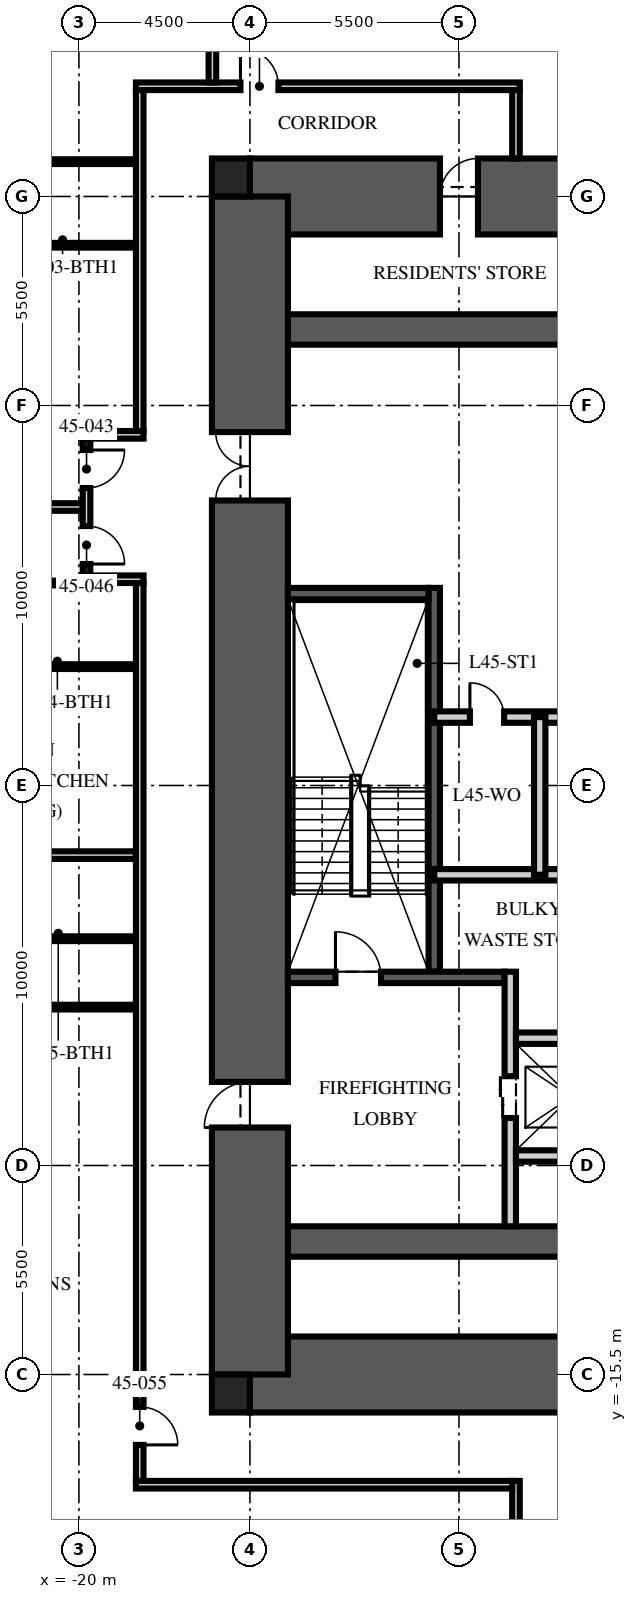
"""IFC4 building model, lengths in metres.
Left out: names, types, materials, properties, quantities, classifications, styles, units other than length and angle.
Written with IfcOpenShell. Run it as: python <this file> out.ifc"""

import sys

from ifc_helpers import new_model, si_unit, direction, frame, frame_2d, origin, origin_2d, place, context, subcontext, project, spatial, rectangle, extrude, element, fill, save


model = new_model("IFC4")
c1 = context("Model", 3, precision=1e-05, world=origin(), true_north=direction((0.0, 1.0)))
c2 = subcontext(c1, "Body", "Model", "MODEL_VIEW")
j1 = project(units=[si_unit("LENGTHUNIT", "METRE"), si_unit("PLANEANGLEUNIT", "RADIAN")], contexts=[c1])
p1 = place(None, origin())
s1 = spatial("IfcSite", under=j1, at=p1, CompositionType="ELEMENT")
p2 = place(p1, origin())
s2 = spatial("IfcBuilding", under=s1, at=p2, CompositionType="ELEMENT")
p3 = place(p2, frame((0.0, 0.0, 178.5)))
s3 = spatial("IfcBuildingStorey", under=s2, at=p3, CompositionType="ELEMENT", Elevation=178.5)
p4 = place(p3, frame((-15.5, 15.5, -0.25), z_axis=(0.0, 0.0, 1.0), x_axis=(1.0, 0.0, 0.0)))
e1 = element("IfcWall", 1, at=p4, inside=s3, PredefinedType="SHEAR", context=c2, shape_type="SweptSolid", body=[
    extrude(rectangle(XDim=31.0, YDim=2.0, at=frame_2d((15.5, 0.0))), origin(), (0.0, 0.0, 1.0), 3.75),
])
p5 = place(p4, frame((5.0, 0.0, 0.25)))
e2 = element("IfcOpeningElement", 2, at=p5, cuts=e1, PredefinedType="OPENING", context=c2, shape_type="SweptSolid", body=[
    extrude(rectangle(XDim=1.0, YDim=2.1, at=frame_2d((0.5, 1.05))), frame((0.0, 1.01, 0.0), z_axis=(0.0, -1.0, 0.0), x_axis=(1.0, 0.0, 0.0)), (0.0, 0.0, 1.0), 2.02),
])
p6 = place(p3, frame((-15.5, -15.5, -0.25), z_axis=(0.0, 0.0, 1.0), x_axis=(1.0, 0.0, 0.0)))
e3 = element("IfcWall", 3, at=p6, inside=s3, PredefinedType="SHEAR", context=c2, shape_type="SweptSolid", body=[
    extrude(rectangle(XDim=31.0, YDim=2.0, at=frame_2d((15.5, 0.0))), origin(), (0.0, 0.0, 1.0), 3.75),
])
p7 = place(p6, frame((10.4, 0.0, 0.25)))
e4 = element("IfcOpeningElement", 4, at=p7, cuts=e3, PredefinedType="OPENING", context=c2, shape_type="SweptSolid", body=[
    extrude(rectangle(XDim=1.1, YDim=2.1, at=frame_2d((0.55, 1.05))), frame((0.0, 1.01, 0.0), z_axis=(0.0, -1.0, 0.0), x_axis=(1.0, 0.0, 0.0)), (0.0, 0.0, 1.0), 2.02),
])
p8 = place(p6, frame((13.5, 0.0, 0.25)))
e5 = element("IfcOpeningElement", 5, at=p8, cuts=e3, PredefinedType="OPENING", context=c2, shape_type="SweptSolid", body=[
    extrude(rectangle(XDim=1.1, YDim=2.1, at=frame_2d((0.55, 1.05))), frame((0.0, 1.01, 0.0), z_axis=(0.0, -1.0, 0.0), x_axis=(1.0, 0.0, 0.0)), (0.0, 0.0, 1.0), 2.02),
])
p9 = place(p6, frame((16.6, 0.0, 0.25)))
e6 = element("IfcOpeningElement", 6, at=p9, cuts=e3, PredefinedType="OPENING", context=c2, shape_type="SweptSolid", body=[
    extrude(rectangle(XDim=1.1, YDim=2.1, at=frame_2d((0.55, 1.05))), frame((0.0, 1.01, 0.0), z_axis=(0.0, -1.0, 0.0), x_axis=(1.0, 0.0, 0.0)), (0.0, 0.0, 1.0), 2.02),
])
for number, where, z_axis, x_axis in (
    (7, (-15.5, 12.0, -0.25), (0.0, 0.0, 1.0), (1.0, 0.0, 0.0)),
    (8, (-15.5, -12.0, -0.25), (0.0, 0.0, 1.0), (1.0, 0.0, 0.0)),
):
    element("IfcWall", number, at=place(p3, frame(where, z_axis=z_axis, x_axis=x_axis)), inside=s3, PredefinedType="SHEAR", context=c2, shape_type="SweptSolid", body=[
        extrude(rectangle(XDim=31.0, YDim=0.8, at=frame_2d((15.5, 0.0))), origin(), (0.0, 0.0, 1.0), 3.75),
    ])
p10 = place(p3, frame((-15.5, -15.5, -0.25), z_axis=(0.0, 0.0, 1.0), x_axis=(0.0, 1.0, 0.0)))
e9 = element("IfcWall", 9, at=p10, inside=s3, PredefinedType="SHEAR", context=c2, shape_type="SweptSolid", body=[
    extrude(rectangle(XDim=31.0, YDim=2.0, at=frame_2d((15.5, 0.0))), origin(), (0.0, 0.0, 1.0), 3.75),
])
p11 = place(p10, frame((6.5, 0.0, 0.25)))
e10 = element("IfcOpeningElement", 10, at=p11, cuts=e9, PredefinedType="OPENING", context=c2, shape_type="SweptSolid", body=[
    extrude(rectangle(XDim=1.2, YDim=2.1, at=frame_2d((0.6, 1.05))), frame((0.0, 1.01, 0.0), z_axis=(0.0, -1.0, 0.0), x_axis=(1.0, 0.0, 0.0)), (0.0, 0.0, 1.0), 2.02),
])
p12 = place(p10, frame((23.0, 0.0, 0.25)))
e11 = element("IfcOpeningElement", 11, at=p12, cuts=e9, PredefinedType="OPENING", context=c2, shape_type="SweptSolid", body=[
    extrude(rectangle(XDim=1.8, YDim=2.1, at=frame_2d((0.9, 1.05))), frame((0.0, 1.01, 0.0), z_axis=(0.0, -1.0, 0.0), x_axis=(1.0, 0.0, 0.0)), (0.0, 0.0, 1.0), 2.02),
])
for number, where, z_axis, x_axis in (
    (12, (-16.0, 16.0, -0.25), (0.0, 0.0, 1.0), (1.0, 0.0, 0.0)),
    (13, (-16.0, -16.0, -0.25), (0.0, 0.0, 1.0), (1.0, 0.0, 0.0)),
):
    element("IfcColumn", number, at=place(p3, frame(where, z_axis=z_axis, x_axis=x_axis)), inside=s3, PredefinedType="COLUMN", context=c2, shape_type="SweptSolid", body=[
        extrude(rectangle(XDim=1.0, YDim=1.0, at=origin_2d()), origin(), (0.0, 0.0, 1.0), 3.75),
    ])
p13 = place(p3, frame((-10.65, -4.9, 0.0), z_axis=(0.0, 0.0, 1.0), x_axis=(0.0, 1.0, 0.0)))
e14 = element("IfcWall", 14, at=p13, inside=s3, PredefinedType="SOLIDWALL", context=c2, shape_type="SweptSolid", body=[
    extrude(rectangle(XDim=10.1, YDim=0.3, at=frame_2d((5.05, 0.0))), origin(), (0.0, 0.0, 1.0), 3.5),
])
p14 = place(p3, frame((-14.5, -5.05, 0.0), z_axis=(0.0, 0.0, 1.0), x_axis=(1.0, 0.0, 0.0)))
e15 = element("IfcWall", 15, at=p14, inside=s3, PredefinedType="SOLIDWALL", context=c2, shape_type="SweptSolid", body=[
    extrude(rectangle(XDim=5.7, YDim=0.3, at=frame_2d((2.85, 0.0))), origin(), (0.0, 0.0, 1.0), 3.5),
])
p15 = place(p14, frame((1.25, 0.0, 0.0)))
e16 = element("IfcOpeningElement", 16, at=p15, cuts=e15, PredefinedType="OPENING", context=c2, shape_type="SweptSolid", body=[
    extrude(rectangle(XDim=1.2, YDim=2.1, at=frame_2d((0.6, 1.05))), frame((0.0, 0.16, 0.0), z_axis=(0.0, -1.0, 0.0), x_axis=(1.0, 0.0, 0.0)), (0.0, 0.0, 1.0), 0.32),
])
p16 = place(p3, frame((-14.5, 5.05, 0.0), z_axis=(0.0, 0.0, 1.0), x_axis=(1.0, 0.0, 0.0)))
e17 = element("IfcWall", 17, at=p16, inside=s3, PredefinedType="SOLIDWALL", context=c2, shape_type="SweptSolid", body=[
    extrude(rectangle(XDim=3.7, YDim=0.3, at=frame_2d((1.85, 0.0))), origin(), (0.0, 0.0, 1.0), 3.5),
])
p17 = place(p3, frame((-8.65, -11.6, 0.0), z_axis=(0.0, 0.0, 1.0), x_axis=(0.0, 1.0, 0.0)))
e18 = element("IfcWall", 18, at=p17, inside=s3, PredefinedType="PARTITIONING", context=c2, shape_type="SweptSolid", body=[
    extrude(rectangle(XDim=6.7, YDim=0.3, at=frame_2d((3.35, 0.0))), origin(), (0.0, 0.0, 1.0), 3.5),
])
p18 = place(p17, frame((2.85, 0.0, 0.0)))
e19 = element("IfcOpeningElement", 19, at=p18, cuts=e18, PredefinedType="OPENING", context=c2, shape_type="SweptSolid", body=[
    extrude(rectangle(XDim=1.1, YDim=2.1, at=frame_2d((0.55, 1.05))), frame((0.0, 0.16, 0.0), z_axis=(0.0, -1.0, 0.0), x_axis=(1.0, 0.0, 0.0)), (0.0, 0.0, 1.0), 0.32),
])
p19 = place(p3, frame((-8.5, -6.65, 0.0), z_axis=(0.0, 0.0, 1.0), x_axis=(1.0, 0.0, 0.0)))
e20 = element("IfcWall", 20, at=p19, inside=s3, PredefinedType="PARTITIONING", context=c2, shape_type="SweptSolid", body=[
    extrude(rectangle(XDim=17.0, YDim=0.3, at=frame_2d((8.5, 0.0))), origin(), (0.0, 0.0, 1.0), 3.5),
])
p20 = place(p19, frame((7.8, 0.0, 0.0)))
e21 = element("IfcOpeningElement", 21, at=p20, cuts=e20, PredefinedType="OPENING", context=c2, shape_type="SweptSolid", body=[
    extrude(rectangle(XDim=1.3, YDim=2.4, at=frame_2d((0.65, 1.2))), frame((0.0, 0.16, 0.0), z_axis=(0.0, -1.0, 0.0), x_axis=(1.0, 0.0, 0.0)), (0.0, 0.0, 1.0), 0.32),
])
p21 = place(p19, frame((5.65, 0.0, 0.0)))
e22 = element("IfcOpeningElement", 22, at=p21, cuts=e20, PredefinedType="OPENING", context=c2, shape_type="SweptSolid", body=[
    extrude(rectangle(XDim=0.9, YDim=2.1, at=frame_2d((0.45, 1.05))), frame((0.0, 0.16, 0.0), z_axis=(0.0, -1.0, 0.0), x_axis=(1.0, 0.0, 0.0)), (0.0, 0.0, 1.0), 0.32),
])
p22 = place(p19, frame((10.4, 0.0, 0.0)))
e23 = element("IfcOpeningElement", 23, at=p22, cuts=e20, PredefinedType="OPENING", context=c2, shape_type="SweptSolid", body=[
    extrude(rectangle(XDim=0.9, YDim=2.1, at=frame_2d((0.45, 1.05))), frame((0.0, 0.16, 0.0), z_axis=(0.0, -1.0, 0.0), x_axis=(1.0, 0.0, 0.0)), (0.0, 0.0, 1.0), 0.32),
])
p23 = place(p3, frame((-8.5, -9.75, 0.0), z_axis=(0.0, 0.0, 1.0), x_axis=(1.0, 0.0, 0.0)))
e24 = element("IfcWall", 24, at=p23, inside=s3, PredefinedType="PARTITIONING", context=c2, shape_type="SweptSolid", body=[
    extrude(rectangle(XDim=2.9, YDim=0.3, at=frame_2d((1.45, 0.0))), origin(), (0.0, 0.0, 1.0), 3.5),
])
p24 = place(p3, frame((-10.65, 1.8, 0.0), z_axis=(0.0, 0.0, 1.0), x_axis=(1.0, 0.0, 0.0)))
e25 = element("IfcWall", 25, at=p24, inside=s3, PredefinedType="PARTITIONING", context=c2, shape_type="SweptSolid", body=[
    extrude(rectangle(XDim=21.3, YDim=0.3, at=frame_2d((10.65, 0.0))), origin(), (0.0, 0.0, 1.0), 3.5),
])
p25 = place(p24, frame((10.05, 0.0, 0.0)))
e26 = element("IfcOpeningElement", 26, at=p25, cuts=e25, PredefinedType="OPENING", context=c2, shape_type="SweptSolid", body=[
    extrude(rectangle(XDim=1.2, YDim=2.1, at=frame_2d((0.6, 1.05))), frame((0.0, 0.16, 0.0), z_axis=(0.0, -1.0, 0.0), x_axis=(1.0, 0.0, 0.0)), (0.0, 0.0, 1.0), 0.32),
])
p26 = place(p24, frame((0.938, 0.0, 0.0)))
e27 = element("IfcOpeningElement", 27, at=p26, cuts=e25, PredefinedType="OPENING", context=c2, shape_type="SweptSolid", body=[
    extrude(rectangle(XDim=0.9, YDim=2.1, at=frame_2d((0.45, 1.05))), frame((0.0, 0.16, 0.0), z_axis=(0.0, -1.0, 0.0), x_axis=(1.0, 0.0, 0.0)), (0.0, 0.0, 1.0), 0.32),
])
p27 = place(p3, frame((-10.65, -2.35, 0.0), z_axis=(0.0, 0.0, 1.0), x_axis=(1.0, 0.0, 0.0)))
e28 = element("IfcWall", 28, at=p27, inside=s3, PredefinedType="PARTITIONING", context=c2, shape_type="SweptSolid", body=[
    extrude(rectangle(XDim=5.55, YDim=0.3, at=frame_2d((2.775, 0.0))), origin(), (0.0, 0.0, 1.0), 3.5),
])
p28 = place(p3, frame((-7.875, -2.35, 0.0), z_axis=(0.0, 0.0, 1.0), x_axis=(0.0, 1.0, 0.0)))
e29 = element("IfcWall", 29, at=p28, inside=s3, PredefinedType="PARTITIONING", context=c2, shape_type="SweptSolid", body=[
    extrude(rectangle(XDim=4.15, YDim=0.3, at=frame_2d((2.075, 0.0))), origin(), (0.0, 0.0, 1.0), 3.5),
])
p29 = place(p3, frame((-18.5, 18.4, 0.0), z_axis=(0.0, 0.0, 1.0), x_axis=(1.0, 0.0, 0.0)))
e30 = element("IfcWall", 30, at=p29, inside=s3, PredefinedType="PARTITIONING", context=c2, shape_type="SweptSolid", body=[
    extrude(rectangle(XDim=10.1, YDim=0.2, at=frame_2d((5.05, 0.0))), origin(), (0.0, 0.0, 1.0), 2.3),
])
p30 = place(p29, frame((2.75, 0.0, 0.0)))
e31 = element("IfcOpeningElement", 31, at=p30, cuts=e30, PredefinedType="OPENING", context=c2, shape_type="SweptSolid", body=[
    extrude(rectangle(XDim=1.0, YDim=2.2, at=frame_2d((0.5, 1.1))), frame((0.0, 0.11, 0.0), z_axis=(0.0, -1.0, 0.0), x_axis=(1.0, 0.0, 0.0)), (0.0, 0.0, 1.0), 0.22),
])
p31 = place(p3, frame((-8.5, 18.3, 0.0), z_axis=(0.0, 0.0, 1.0), x_axis=(0.0, -1.0, 0.0)))
e32 = element("IfcWall", 32, at=p31, inside=s3, PredefinedType="PARTITIONING", context=c2, shape_type="SweptSolid", body=[
    extrude(rectangle(XDim=1.8, YDim=0.2, at=frame_2d((0.9, 0.0))), origin(), (0.0, 0.0, 1.0), 3.5),
])
p32 = place(p3, frame((-16.488, 18.5, 0.0), z_axis=(0.0, 0.0, 1.0), x_axis=(0.0, 1.0, 0.0)))
e33 = element("IfcWall", 33, at=p32, inside=s3, PredefinedType="PARTITIONING", context=c2, shape_type="SweptSolid", body=[
    extrude(rectangle(XDim=9.65, YDim=0.2, at=frame_2d((4.825, 0.0))), origin(), (0.0, 0.0, 1.0), 2.81),
])
p33 = place(p3, frame((-19.9, 7.328, 0.0), z_axis=(0.0, 0.0, 1.0), x_axis=(-1.0, 0.0, 0.0)))
e34 = element("IfcWall", 34, at=p33, inside=s3, PredefinedType="PARTITIONING", context=c2, shape_type="SweptSolid", body=[
    extrude(rectangle(XDim=8.25, YDim=0.2, at=frame_2d((4.125, 0.0))), origin(), (0.0, 0.0, 1.0), 2.81),
])
p34 = place(p3, frame((-18.5, -1.832, 0.0), z_axis=(0.0, 0.0, 1.0), x_axis=(-1.0, 0.0, 0.0)))
e35 = element("IfcWall", 35, at=p34, inside=s3, PredefinedType="PARTITIONING", context=c2, shape_type="SweptSolid", body=[
    extrude(rectangle(XDim=9.65, YDim=0.2, at=frame_2d((4.825, 0.0))), origin(), (0.0, 0.0, 1.0), 2.81),
])
for number, where, z_axis, x_axis in (
    (36, (-18.5, 16.417, 0.0), (0.0, 0.0, 1.0), (-1.0, 0.0, 0.0)),
    (37, (-18.5, 14.217, 0.0), (0.0, 0.0, 1.0), (-1.0, 0.0, 0.0)),
):
    element("IfcWall", number, at=place(p3, frame(where, z_axis=z_axis, x_axis=x_axis)), inside=s3, PredefinedType="PARTITIONING", context=c2, shape_type="SweptSolid", body=[
        extrude(rectangle(XDim=3.53, YDim=0.125, at=frame_2d((1.765, 0.0))), origin(), (0.0, 0.0, 1.0), 3.5),
    ])
p35 = place(p3, frame((-19.97, 5.328, 0.0), z_axis=(0.0, 0.0, 1.0), x_axis=(-1.0, 0.0, 0.0)))
e38 = element("IfcWall", 38, at=p35, inside=s3, PredefinedType="PARTITIONING", context=c2, shape_type="SweptSolid", body=[
    extrude(rectangle(XDim=2.06, YDim=0.125, at=frame_2d((1.03, 0.0))), origin(), (0.0, 0.0, 1.0), 3.5),
])
for number, where, z_axis, x_axis in (
    (39, (-18.5, 3.128, 0.0), (0.0, 0.0, 1.0), (-1.0, 0.0, 0.0)),
    (40, (-18.5, -4.032, 0.0), (0.0, 0.0, 1.0), (-1.0, 0.0, 0.0)),
    (41, (-18.5, -5.832, 0.0), (0.0, 0.0, 1.0), (-1.0, 0.0, 0.0)),
):
    element("IfcWall", number, at=place(p3, frame(where, z_axis=z_axis, x_axis=x_axis)), inside=s3, PredefinedType="PARTITIONING", context=c2, shape_type="SweptSolid", body=[
        extrude(rectangle(XDim=3.53, YDim=0.125, at=frame_2d((1.765, 0.0))), origin(), (0.0, 0.0, 1.0), 3.5),
    ])
p36 = place(p3, frame((-18.4, 18.3, 0.0), z_axis=(0.0, 0.0, 1.0), x_axis=(0.0, -1.0, 0.0)))
e42 = element("IfcWall", 42, at=p36, inside=s3, PredefinedType="PARTITIONING", context=c2, shape_type="SweptSolid", body=[
    extrude(rectangle(XDim=8.972, YDim=0.2, at=frame_2d((4.486, 0.0))), origin(), (0.0, 0.0, 1.0), 2.3),
])
p37 = place(p3, frame((-18.3, 9.228, 0.0), z_axis=(0.0, 0.0, 1.0), x_axis=(-1.0, 0.0, 0.0)))
e43 = element("IfcWall", 43, at=p37, inside=s3, PredefinedType="PARTITIONING", context=c2, shape_type="SweptSolid", body=[
    extrude(rectangle(XDim=1.6, YDim=0.2, at=frame_2d((0.8, 0.0))), origin(), (0.0, 0.0, 1.0), 2.7),
])
p38 = place(p3, frame((-18.3, 5.428, 0.0), z_axis=(0.0, 0.0, 1.0), x_axis=(-1.0, 0.0, 0.0)))
e44 = element("IfcWall", 44, at=p38, inside=s3, PredefinedType="PARTITIONING", context=c2, shape_type="SweptSolid", body=[
    extrude(rectangle(XDim=1.6, YDim=0.2, at=frame_2d((0.8, 0.0))), origin(), (0.0, 0.0, 1.0), 3.5),
])
p39 = place(p3, frame((-19.8, 9.128, 0.0), z_axis=(0.0, 0.0, 1.0), x_axis=(0.0, -1.0, 0.0)))
e45 = element("IfcWall", 45, at=p39, inside=s3, PredefinedType="PARTITIONING", context=c2, shape_type="SweptSolid", body=[
    extrude(rectangle(XDim=3.6, YDim=0.2, at=frame_2d((1.8, 0.0))), origin(), (0.0, 0.0, 1.0), 2.7),
])
p40 = place(p39, frame((0.3, 0.0, 0.0)))
e46 = element("IfcOpeningElement", 46, at=p40, cuts=e45, PredefinedType="OPENING", context=c2, shape_type="SweptSolid", body=[
    extrude(rectangle(XDim=1.0, YDim=2.2, at=frame_2d((0.5, 1.1))), frame((0.0, 0.11, 0.0), z_axis=(0.0, -1.0, 0.0), x_axis=(1.0, 0.0, 0.0)), (0.0, 0.0, 1.0), 0.22),
])
p41 = place(p39, frame((2.3, 0.0, 0.0)))
e47 = element("IfcOpeningElement", 47, at=p41, cuts=e45, PredefinedType="OPENING", context=c2, shape_type="SweptSolid", body=[
    extrude(rectangle(XDim=1.0, YDim=2.2, at=frame_2d((0.5, 1.1))), frame((0.0, 0.11, 0.0), z_axis=(0.0, -1.0, 0.0), x_axis=(1.0, 0.0, 0.0)), (0.0, 0.0, 1.0), 0.22),
])
p42 = place(p3, frame((-18.4, 5.328, 0.0), z_axis=(0.0, 0.0, 1.0), x_axis=(0.0, -1.0, 0.0)))
e48 = element("IfcWall", 48, at=p42, inside=s3, PredefinedType="PARTITIONING", context=c2, shape_type="SweptSolid", body=[
    extrude(rectangle(XDim=23.628, YDim=0.2, at=frame_2d((11.814, 0.0))), origin(), (0.0, 0.0, 1.0), 2.3),
])
p43 = place(p42, frame((21.68, 0.0, 0.0)))
e49 = element("IfcOpeningElement", 49, at=p43, cuts=e48, PredefinedType="OPENING", context=c2, shape_type="SweptSolid", body=[
    extrude(rectangle(XDim=1.0, YDim=2.2, at=frame_2d((0.5, 1.1))), frame((0.0, 0.11, 0.0), z_axis=(0.0, -1.0, 0.0), x_axis=(1.0, 0.0, 0.0)), (0.0, 0.0, 1.0), 0.22),
])
p44 = place(p3, frame((-8.5, -18.3, 0.0), z_axis=(0.0, 0.0, 1.0), x_axis=(0.0, -1.0, 0.0)))
e50 = element("IfcWall", 50, at=p44, inside=s3, PredefinedType="PARTITIONING", context=c2, shape_type="SweptSolid", body=[
    extrude(rectangle(XDim=3.0, YDim=0.2, at=frame_2d((1.5, 0.0))), origin(), (0.0, 0.0, 1.0), 3.5),
])
p45 = place(p3, frame((-8.6, -18.4, 0.0), z_axis=(0.0, 0.0, 1.0), x_axis=(-1.0, 0.0, 0.0)))
e51 = element("IfcWall", 51, at=p45, inside=s3, PredefinedType="PARTITIONING", context=c2, shape_type="SweptSolid", body=[
    extrude(rectangle(XDim=9.9, YDim=0.2, at=frame_2d((4.95, 0.0))), origin(), (0.0, 0.0, 1.0), 2.3),
])
p46 = place(p15, origin())
e52 = element("IfcDoor", 52, at=p46, inside=s3, OperationType="SINGLE_SWING_LEFT", PredefinedType="DOOR", context=c2, shape_type="SweptSolid", body=[
    extrude(rectangle(XDim=1.2, YDim=2.1, at=frame_2d((0.6, 1.05))), frame((0.0, 0.025, 0.0), z_axis=(0.0, -1.0, 0.0), x_axis=(1.0, 0.0, 0.0)), (0.0, 0.0, 1.0), 0.05),
])
fill(e16, e52)
p47 = place(p11, origin())
e53 = element("IfcDoor", 53, at=p47, inside=s3, OperationType="SINGLE_SWING_LEFT", PredefinedType="DOOR", context=c2, shape_type="SweptSolid", body=[
    extrude(rectangle(XDim=1.2, YDim=2.1, at=frame_2d((0.6, 1.05))), frame((0.0, 0.025, 0.0), z_axis=(0.0, -1.0, 0.0), x_axis=(1.0, 0.0, 0.0)), (0.0, 0.0, 1.0), 0.05),
])
fill(e10, e53)
p48 = place(p12, origin())
e54 = element("IfcDoor", 54, at=p48, inside=s3, OperationType="DOUBLE_DOOR_SINGLE_SWING", PredefinedType="DOOR", context=c2, shape_type="SweptSolid", body=[
    extrude(rectangle(XDim=1.8, YDim=2.1, at=frame_2d((0.9, 1.05))), frame((0.0, 0.025, 0.0), z_axis=(0.0, -1.0, 0.0), x_axis=(1.0, 0.0, 0.0)), (0.0, 0.0, 1.0), 0.05),
])
fill(e11, e54)
p49 = place(p18, origin())
e55 = element("IfcDoor", 55, at=p49, inside=s3, OperationType="DOUBLE_DOOR_SLIDING", PredefinedType="DOOR", context=c2, shape_type="SweptSolid", body=[
    extrude(rectangle(XDim=1.1, YDim=2.1, at=frame_2d((0.55, 1.05))), frame((0.0, 0.025, 0.0), z_axis=(0.0, -1.0, 0.0), x_axis=(1.0, 0.0, 0.0)), (0.0, 0.0, 1.0), 0.05),
])
fill(e19, e55)
p50 = place(p26, origin())
e56 = element("IfcDoor", 56, at=p50, inside=s3, OperationType="SINGLE_SWING_LEFT", PredefinedType="DOOR", context=c2, shape_type="SweptSolid", body=[
    extrude(rectangle(XDim=0.9, YDim=2.1, at=frame_2d((0.45, 1.05))), frame((0.0, 0.025, 0.0), z_axis=(0.0, -1.0, 0.0), x_axis=(1.0, 0.0, 0.0)), (0.0, 0.0, 1.0), 0.05),
])
fill(e27, e56)
p51 = place(p5, origin())
e57 = element("IfcDoor", 57, at=p51, inside=s3, OperationType="SINGLE_SWING_RIGHT", PredefinedType="DOOR", context=c2, shape_type="SweptSolid", body=[
    extrude(rectangle(XDim=1.0, YDim=2.1, at=frame_2d((0.5, 1.05))), frame((0.0, 0.025, 0.0), z_axis=(0.0, -1.0, 0.0), x_axis=(1.0, 0.0, 0.0)), (0.0, 0.0, 1.0), 0.05),
])
fill(e2, e57)
p52 = place(p30, origin())
e58 = element("IfcDoor", 58, at=p52, inside=s3, OperationType="SINGLE_SWING_LEFT", PredefinedType="DOOR", context=c2, shape_type="SweptSolid", body=[
    extrude(rectangle(XDim=1.0, YDim=2.2, at=frame_2d((0.5, 1.1))), frame((0.0, 0.025, 0.0), z_axis=(0.0, -1.0, 0.0), x_axis=(1.0, 0.0, 0.0)), (0.0, 0.0, 1.0), 0.05),
])
fill(e31, e58)
p53 = place(p40, origin())
e59 = element("IfcDoor", 59, at=p53, inside=s3, OperationType="SINGLE_SWING_LEFT", PredefinedType="DOOR", context=c2, shape_type="SweptSolid", body=[
    extrude(rectangle(XDim=1.0, YDim=2.2, at=frame_2d((0.5, 1.1))), frame((0.0, 0.025, 0.0), z_axis=(0.0, -1.0, 0.0), x_axis=(1.0, 0.0, 0.0)), (0.0, 0.0, 1.0), 0.05),
])
fill(e46, e59)
p54 = place(p41, origin())
e60 = element("IfcDoor", 60, at=p54, inside=s3, OperationType="SINGLE_SWING_RIGHT", PredefinedType="DOOR", context=c2, shape_type="SweptSolid", body=[
    extrude(rectangle(XDim=1.0, YDim=2.2, at=frame_2d((0.5, 1.1))), frame((0.0, 0.025, 0.0), z_axis=(0.0, -1.0, 0.0), x_axis=(1.0, 0.0, 0.0)), (0.0, 0.0, 1.0), 0.05),
])
fill(e47, e60)
p55 = place(p43, origin())
e61 = element("IfcDoor", 61, at=p55, inside=s3, OperationType="SINGLE_SWING_RIGHT", PredefinedType="DOOR", context=c2, shape_type="SweptSolid", body=[
    extrude(rectangle(XDim=1.0, YDim=2.2, at=frame_2d((0.5, 1.1))), frame((0.0, 0.025, 0.0), z_axis=(0.0, -1.0, 0.0), x_axis=(1.0, 0.0, 0.0)), (0.0, 0.0, 1.0), 0.05),
])
fill(e49, e61)
save(model, sys.argv[1])
